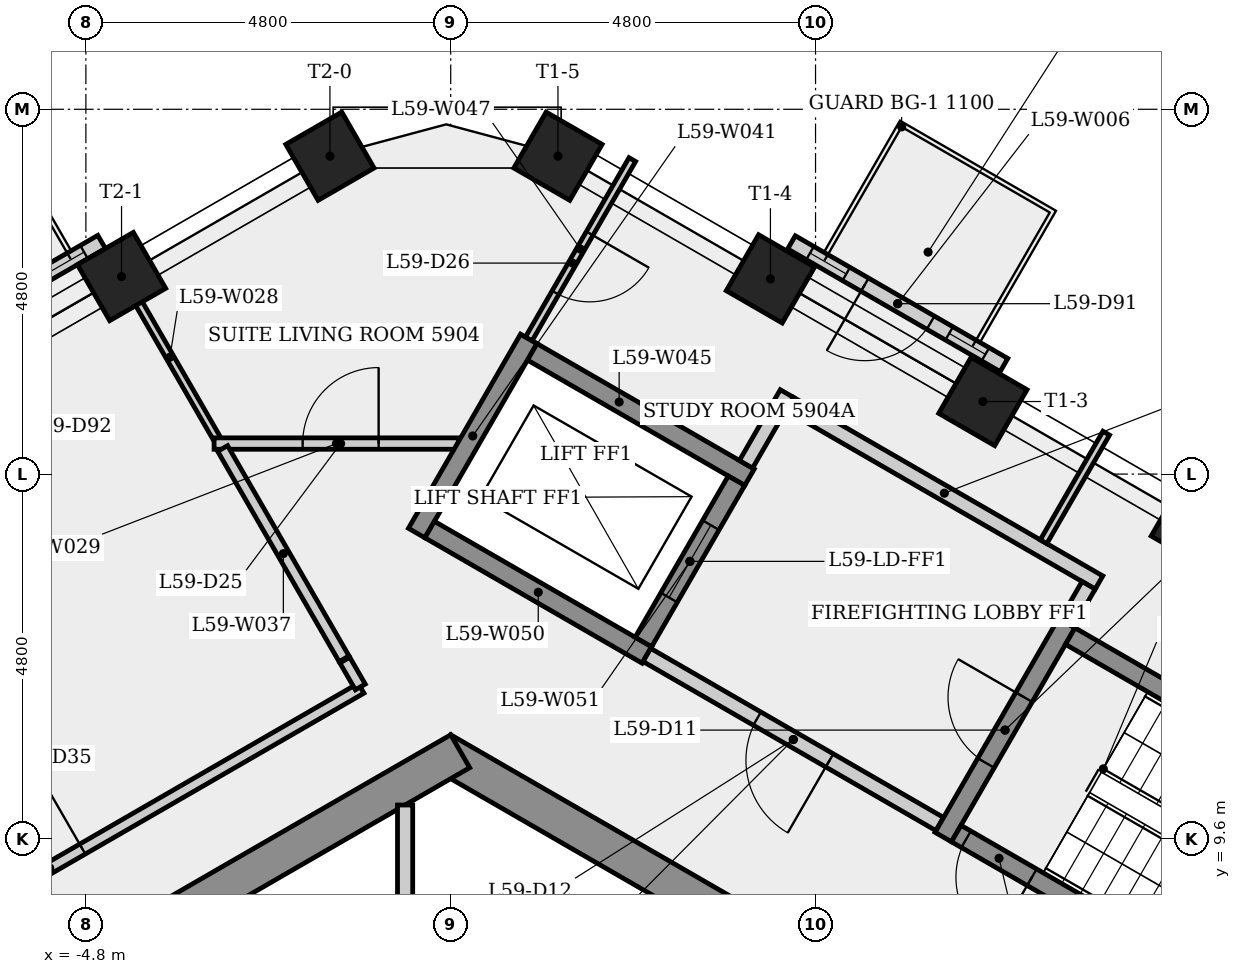
"""IFC4 building model, lengths in metres.
Left out: names, types, materials, properties, quantities, classifications, styles, units other than length and angle.
Written with IfcOpenShell. Run it as: python <this file> out.ifc"""

import sys

from ifc_helpers import new_model, si_unit, direction, frame, frame_2d, origin, origin_2d, place, context, subcontext, project, spatial, rectangle, extrude, element, fill, save


model = new_model("IFC4")
c1 = context("Model", 3, precision=1e-05, world=origin(), true_north=direction((0.0, 1.0)))
c2 = subcontext(c1, "Body", "Model", "MODEL_VIEW")
j1 = project(units=[si_unit("LENGTHUNIT", "METRE"), si_unit("PLANEANGLEUNIT", "RADIAN")], contexts=[c1])
p1 = place(None, origin())
s1 = spatial("IfcSite", under=j1, at=p1, CompositionType="ELEMENT")
p2 = place(p1, origin())
s2 = spatial("IfcBuilding", under=s1, at=p2, CompositionType="ELEMENT")
p3 = place(p2, frame((0.0, 0.0, 222.3)))
s3 = spatial("IfcBuildingStorey", under=s2, at=p3, CompositionType="ELEMENT", Elevation=222.3)
p4 = place(p3, frame((9.375, 5.268, 0.0), z_axis=(0.0, 0.0, 1.0), x_axis=(-0.866023993627, 0.500002442456, 0.0)))
e1 = element("IfcWall", 1, at=p4, inside=s3, PredefinedType="SHEAR", context=c2, shape_type="SweptSolid", body=[
    extrude(rectangle(XDim=10.97, YDim=0.5, at=frame_2d((5.485, 0.0))), origin(), (0.0, 0.0, 1.0), 3.4),
])
p5 = place(p4, frame((5.382, 0.0, 0.0)))
e2 = element("IfcOpeningElement", 2, at=p5, cuts=e1, PredefinedType="OPENING", context=c2, shape_type="SweptSolid", body=[
    extrude(rectangle(XDim=0.9, YDim=2.1, at=frame_2d((0.45, 1.05))), frame((0.0, 0.26, 0.0), z_axis=(0.0, -1.0, 0.0), x_axis=(1.0, 0.0, 0.0)), (0.0, 0.0, 1.0), 0.52),
])
p6 = place(p3, frame((0.125, 10.753, 0.0), z_axis=(0.0, 0.0, 1.0), x_axis=(-0.866023993627, -0.500002442456, 0.0)))
e3 = element("IfcWall", 3, at=p6, inside=s3, PredefinedType="SHEAR", context=c2, shape_type="SweptSolid", body=[
    extrude(rectangle(XDim=10.97, YDim=0.5, at=frame_2d((5.485, 0.0))), origin(), (0.0, 0.0, 1.0), 3.4),
])
p7 = place(p6, frame((7.08, 0.0, 0.0)))
e4 = element("IfcOpeningElement", 4, at=p7, cuts=e3, PredefinedType="OPENING", context=c2, shape_type="SweptSolid", body=[
    extrude(rectangle(XDim=0.9, YDim=2.1, at=frame_2d((0.45, 1.05))), frame((0.0, 0.26, 0.0), z_axis=(0.0, -1.0, 0.0), x_axis=(1.0, 0.0, 0.0)), (0.0, 0.0, 1.0), 0.52),
])
for number, where, z_axis, x_axis in (
    (5, (9.797, 13.741, 0.0), (0.0, 0.0, 1.0), (0.5, 0.866, 0.0)),
    (6, (7.001, 15.355, 0.0), (0.0, 0.0, 1.0), (0.5, 0.866, 0.0)),
    (7, (4.206, 16.969, 0.0), (0.0, 0.0, 1.0), (0.5, 0.866, 0.0)),
    (8, (1.411, 18.583, 0.0), (0.0, 0.0, 1.0), (0.5, 0.866, 0.0)),
    (9, (-1.589, 18.583, 0.0), (0.0, 0.0, 1.0), (-0.5, 0.866, 0.0)),
    (10, (-4.331, 17.0, 0.0), (0.0, 0.0, 1.0), (-0.5, 0.866, 0.0)),
):
    element("IfcColumn", number, at=place(p3, frame(where, z_axis=z_axis, x_axis=x_axis)), inside=s3, PredefinedType="COLUMN", context=c2, shape_type="SweptSolid", body=[
        extrude(rectangle(XDim=0.85, YDim=0.85, at=origin_2d()), origin(), (0.0, 0.0, 1.0), 3.4),
    ])
p8 = place(p3, frame((-4.593, 17.454, 0.0), z_axis=(0.0, 0.0, 1.0), x_axis=(-0.866023832351, -0.500002721793, 0.0)))
e11 = element("IfcWall", 11, at=p8, inside=s3, PredefinedType="SOLIDWALL", context=c2, shape_type="SweptSolid", body=[
    extrude(rectangle(XDim=3.167, YDim=0.2, at=frame_2d((1.583, 0.0))), origin(), (0.0, 0.0, 1.0), 3.4),
])
p9 = place(p8, frame((1.083, 0.0, 0.0)))
e12 = element("IfcOpeningElement", 12, at=p9, cuts=e11, PredefinedType="OPENING", context=c2, shape_type="SweptSolid", body=[
    extrude(rectangle(XDim=1.0, YDim=2.4, at=frame_2d((0.5, 1.2))), frame((0.0, 0.11, 0.0), z_axis=(0.0, -1.0, 0.0), x_axis=(1.0, 0.0, 0.0)), (0.0, 0.0, 1.0), 0.22),
])
p10 = place(p8, frame((0.267, 0.0, 0.9)))
e13 = element("IfcOpeningElement", 13, at=p10, cuts=e11, PredefinedType="OPENING", context=c2, shape_type="SweptSolid", body=[
    extrude(rectangle(XDim=0.55, YDim=1.5, at=frame_2d((0.275, 0.75))), frame((0.0, 0.11, 0.0), z_axis=(0.0, -1.0, 0.0), x_axis=(1.0, 0.0, 0.0)), (0.0, 0.0, 1.0), 0.22),
])
p11 = place(p8, frame((2.35, 0.0, 0.9)))
e14 = element("IfcOpeningElement", 14, at=p11, cuts=e11, PredefinedType="OPENING", context=c2, shape_type="SweptSolid", body=[
    extrude(rectangle(XDim=0.55, YDim=1.5, at=frame_2d((0.275, 0.75))), frame((0.0, 0.11, 0.0), z_axis=(0.0, -1.0, 0.0), x_axis=(1.0, 0.0, 0.0)), (0.0, 0.0, 1.0), 0.22),
])
p12 = place(p3, frame((7.279, 15.835, 0.0), z_axis=(0.0, 0.0, 1.0), x_axis=(-0.86601428741, 0.500019253631, 0.0)))
e15 = element("IfcWall", 15, at=p12, inside=s3, PredefinedType="SOLIDWALL", context=c2, shape_type="SweptSolid", body=[
    extrude(rectangle(XDim=3.228, YDim=0.2, at=frame_2d((1.614, 0.0))), origin(), (0.0, 0.0, 1.0), 3.4),
])
p13 = place(p12, frame((1.114, 0.0, 0.0)))
e16 = element("IfcOpeningElement", 16, at=p13, cuts=e15, PredefinedType="OPENING", context=c2, shape_type="SweptSolid", body=[
    extrude(rectangle(XDim=1.0, YDim=2.4, at=frame_2d((0.5, 1.2))), frame((0.0, 0.11, 0.0), z_axis=(0.0, -1.0, 0.0), x_axis=(1.0, 0.0, 0.0)), (0.0, 0.0, 1.0), 0.22),
])
p14 = place(p12, frame((0.282, 0.0, 0.9)))
e17 = element("IfcOpeningElement", 17, at=p14, cuts=e15, PredefinedType="OPENING", context=c2, shape_type="SweptSolid", body=[
    extrude(rectangle(XDim=0.55, YDim=1.5, at=frame_2d((0.275, 0.75))), frame((0.0, 0.11, 0.0), z_axis=(0.0, -1.0, 0.0), x_axis=(1.0, 0.0, 0.0)), (0.0, 0.0, 1.0), 0.22),
])
p15 = place(p12, frame((2.396, 0.0, 0.9)))
e18 = element("IfcOpeningElement", 18, at=p15, cuts=e15, PredefinedType="OPENING", context=c2, shape_type="SweptSolid", body=[
    extrude(rectangle(XDim=0.55, YDim=1.5, at=frame_2d((0.275, 0.75))), frame((0.0, 0.11, 0.0), z_axis=(0.0, -1.0, 0.0), x_axis=(1.0, 0.0, 0.0)), (0.0, 0.0, 1.0), 0.22),
])
p16 = place(p3, frame((-9.376, 6.85, 0.0), z_axis=(0.0, 0.0, 1.0), x_axis=(0.866029654818, 0.499992636921, 0.0)))
e19 = element("IfcWall", 19, at=p16, inside=s3, PredefinedType="PARTITIONING", context=c2, shape_type="SweptSolid", body=[
    extrude(rectangle(XDim=9.465, YDim=0.15, at=frame_2d((4.732, 0.0))), origin(), (0.0, 0.0, 1.0), 3.05),
])
p17 = place(p16, frame((4.232, 0.0, 0.0)))
e20 = element("IfcOpeningElement", 20, at=p17, cuts=e19, PredefinedType="OPENING", context=c2, shape_type="SweptSolid", body=[
    extrude(rectangle(XDim=1.0, YDim=2.1, at=frame_2d((0.5, 1.05))), frame((0.0, 0.085, 0.0), z_axis=(0.0, -1.0, 0.0), x_axis=(1.0, 0.0, 0.0)), (0.0, 0.0, 1.0), 0.17),
])
p18 = place(p3, frame((-3.076, 14.867, 0.0), z_axis=(0.0, 0.0, 1.0), x_axis=(-0.500001430823, 0.866024577697, 0.0)))
e21 = element("IfcWall", 21, at=p18, inside=s3, PredefinedType="PARTITIONING", context=c2, shape_type="SweptSolid", body=[
    extrude(rectangle(XDim=2.475, YDim=0.1, at=frame_2d((1.237, 0.0))), origin(), (0.0, 0.0, 1.0), 3.05),
])
p19 = place(p3, frame((-3.113, 14.802, 0.0), z_axis=(0.0, 0.0, 1.0), x_axis=(1.0, 0.0, 0.0)))
e22 = element("IfcWall", 22, at=p19, inside=s3, PredefinedType="PARTITIONING", context=c2, shape_type="SweptSolid", body=[
    extrude(rectangle(XDim=3.22, YDim=0.15, at=frame_2d((1.61, 0.0))), origin(), (0.0, 0.0, 1.0), 3.05),
])
p20 = place(p19, frame((1.165, 0.0, 0.0)))
e23 = element("IfcOpeningElement", 23, at=p20, cuts=e22, PredefinedType="OPENING", context=c2, shape_type="SweptSolid", body=[
    extrude(rectangle(XDim=1.0, YDim=2.1, at=frame_2d((0.5, 1.05))), frame((0.0, 0.085, 0.0), z_axis=(0.0, -1.0, 0.0), x_axis=(1.0, 0.0, 0.0)), (0.0, 0.0, 1.0), 0.17),
])
p21 = place(p3, frame((-1.403, 11.97, 0.0), z_axis=(0.0, 0.0, 1.0), x_axis=(-0.499960573946, 0.866048165231, 0.0)))
e24 = element("IfcWall", 24, at=p21, inside=s3, PredefinedType="PARTITIONING", context=c2, shape_type="SweptSolid", body=[
    extrude(rectangle(XDim=3.195, YDim=0.15, at=frame_2d((1.598, 0.0))), origin(), (0.0, 0.0, 1.0), 3.05),
])
p22 = place(p3, frame((-1.393, 11.952, 0.0), z_axis=(0.0, 0.0, 1.0), x_axis=(0.500068051468, -0.865986110686, 0.0)))
e25 = element("IfcWall", 25, at=p22, inside=s3, PredefinedType="PARTITIONING", context=c2, shape_type="SweptSolid", body=[
    extrude(rectangle(XDim=0.408, YDim=0.15, at=frame_2d((0.204, 0.0))), origin(), (0.0, 0.0, 1.0), 3.05),
])
p23 = place(p3, frame((-0.6, 10.046, 0.0), z_axis=(0.0, 0.0, 1.0), x_axis=(0.0, -1.0, 0.0)))
e26 = element("IfcWall", 26, at=p23, inside=s3, PredefinedType="PARTITIONING", context=c2, shape_type="SweptSolid", body=[
    extrude(rectangle(XDim=4.771, YDim=0.2, at=frame_2d((2.385, 0.0))), origin(), (0.0, 0.0, 1.0), 3.05),
])
p24 = place(p3, frame((-0.448, 13.624, 0.0), z_axis=(0.0, 0.0, 1.0), x_axis=(0.500037662692, 0.866003658127, 0.0)))
e27 = element("IfcWall", 27, at=p24, inside=s3, PredefinedType="SHEAR", context=c2, shape_type="SweptSolid", body=[
    extrude(rectangle(XDim=2.95, YDim=0.25, at=frame_2d((1.475, 0.0))), origin(), (0.0, 0.0, 1.0), 3.05),
])
p25 = place(p3, frame((1.073, 16.008, 0.0), z_axis=(0.0, 0.0, 1.0), x_axis=(0.866040211805, -0.499974350878, 0.0)))
e28 = element("IfcWall", 28, at=p25, inside=s3, PredefinedType="SHEAR", context=c2, shape_type="SweptSolid", body=[
    extrude(rectangle(XDim=3.3, YDim=0.25, at=frame_2d((1.65, 0.0))), origin(), (0.0, 0.0, 1.0), 3.05),
])
p26 = place(p3, frame((2.389, 18.538, 0.0), z_axis=(0.0, 0.0, 1.0), x_axis=(-0.500004325324, -0.866022906543, 0.0)))
e29 = element("IfcWall", 29, at=p26, inside=s3, PredefinedType="PARTITIONING", context=c2, shape_type="SweptSolid", body=[
    extrude(rectangle(XDim=2.724, YDim=0.1, at=frame_2d((1.362, 0.0))), origin(), (0.0, 0.0, 1.0), 3.05),
])
p27 = place(p26, frame((1.123, 0.0, 0.0)))
e30 = element("IfcOpeningElement", 30, at=p27, cuts=e29, PredefinedType="OPENING", context=c2, shape_type="SweptSolid", body=[
    extrude(rectangle(XDim=0.9, YDim=2.1, at=frame_2d((0.45, 1.05))), frame((0.0, 0.06, 0.0), z_axis=(0.0, -1.0, 0.0), x_axis=(1.0, 0.0, 0.0)), (0.0, 0.0, 1.0), 0.12),
])
p28 = place(p3, frame((2.581, 12.02, 0.0), z_axis=(0.0, 0.0, 1.0), x_axis=(-0.866040211805, 0.499974350878, 0.0)))
e31 = element("IfcWall", 31, at=p28, inside=s3, PredefinedType="SHEAR", context=c2, shape_type="SweptSolid", body=[
    extrude(rectangle(XDim=3.3, YDim=0.25, at=frame_2d((1.65, 0.0))), origin(), (0.0, 0.0, 1.0), 3.05),
])
p29 = place(p3, frame((2.535, 12.191, 0.0), z_axis=(0.0, 0.0, 1.0), x_axis=(0.500061746146, 0.865989751695, 0.0)))
e32 = element("IfcWall", 32, at=p29, inside=s3, PredefinedType="SHEAR", context=c2, shape_type="SweptSolid", body=[
    extrude(rectangle(XDim=2.45, YDim=0.25, at=frame_2d((1.225, 0.0))), origin(), (0.0, 0.0, 1.0), 3.4),
])
p30 = place(p29, frame((0.675, 0.0, 0.0)))
e33 = element("IfcOpeningElement", 33, at=p30, cuts=e32, PredefinedType="OPENING", context=c2, shape_type="SweptSolid", body=[
    extrude(rectangle(XDim=1.1, YDim=2.1, at=frame_2d((0.55, 1.05))), frame((0.0, 0.135, 0.0), z_axis=(0.0, -1.0, 0.0), x_axis=(1.0, 0.0, 0.0)), (0.0, 0.0, 1.0), 0.27),
])
p31 = place(p3, frame((3.885, 14.529, 0.0), z_axis=(0.0, 0.0, 1.0), x_axis=(0.499997628298, 0.866026773083, 0.0)))
e34 = element("IfcWall", 34, at=p31, inside=s3, PredefinedType="PARTITIONING", context=c2, shape_type="SweptSolid", body=[
    extrude(rectangle(XDim=1.075, YDim=0.2, at=frame_2d((0.538, 0.0))), origin(), (0.0, 0.0, 1.0), 3.05),
])
p32 = place(p3, frame((4.459, 15.323, 0.0), z_axis=(0.0, 0.0, 1.0), x_axis=(0.866016039709, -0.500016218704, 0.0)))
e35 = element("IfcWall", 35, at=p32, inside=s3, PredefinedType="PARTITIONING", context=c2, shape_type="SweptSolid", body=[
    extrude(rectangle(XDim=4.7, YDim=0.2, at=frame_2d((2.35, 0.0))), origin(), (0.0, 0.0, 1.0), 3.05),
])
p33 = place(p3, frame((6.435, 9.795, 0.0), z_axis=(0.0, 0.0, 1.0), x_axis=(-0.866012907634, 0.500021643343, 0.0)))
e36 = element("IfcWall", 36, at=p33, inside=s3, PredefinedType="PARTITIONING", context=c2, shape_type="SweptSolid", body=[
    extrude(rectangle(XDim=4.45, YDim=0.2, at=frame_2d((2.225, 0.0))), origin(), (0.0, 0.0, 1.0), 3.05),
])
p34 = place(p33, frame((1.675, 0.0, 0.0)))
e37 = element("IfcOpeningElement", 37, at=p34, cuts=e36, PredefinedType="OPENING", context=c2, shape_type="SweptSolid", body=[
    extrude(rectangle(XDim=1.1, YDim=2.1, at=frame_2d((0.55, 1.05))), frame((0.0, 0.11, 0.0), z_axis=(0.0, -1.0, 0.0), x_axis=(1.0, 0.0, 0.0)), (0.0, 0.0, 1.0), 0.22),
])
p35 = place(p3, frame((6.48, 9.624, 0.0), z_axis=(0.0, 0.0, 1.0), x_axis=(0.500017246033, 0.866015446554, 0.0)))
e38 = element("IfcWall", 38, at=p35, inside=s3, PredefinedType="SHEAR", context=c2, shape_type="SweptSolid", body=[
    extrude(rectangle(XDim=3.25, YDim=0.25, at=frame_2d((1.625, 0.0))), origin(), (0.0, 0.0, 1.0), 3.05),
])
p36 = place(p35, frame((1.125, 0.0, 0.0)))
e39 = element("IfcOpeningElement", 39, at=p36, cuts=e38, PredefinedType="OPENING", context=c2, shape_type="SweptSolid", body=[
    extrude(rectangle(XDim=1.0, YDim=2.1, at=frame_2d((0.5, 1.05))), frame((0.0, 0.135, 0.0), z_axis=(0.0, -1.0, 0.0), x_axis=(1.0, 0.0, 0.0)), (0.0, 0.0, 1.0), 0.27),
])
p37 = place(p3, frame((7.8, 13.51, 0.0), z_axis=(0.0, 0.0, 1.0), x_axis=(0.499944585209, 0.866057395165, 0.0)))
e40 = element("IfcWall", 40, at=p37, inside=s3, PredefinedType="PARTITIONING", context=c2, shape_type="SweptSolid", body=[
    extrude(rectangle(XDim=1.649, YDim=0.1, at=frame_2d((0.825, 0.0))), origin(), (0.0, 0.0, 1.0), 3.05),
])
p38 = place(p3, frame((8.151, 12.268, 0.0), z_axis=(0.0, 0.0, 1.0), x_axis=(0.866025499775, -0.499999833739, 0.0)))
e41 = element("IfcWall", 41, at=p38, inside=s3, PredefinedType="SHEAR", context=c2, shape_type="SweptSolid", body=[
    extrude(rectangle(XDim=6.4, YDim=0.25, at=frame_2d((3.2, 0.0))), origin(), (0.0, 0.0, 1.0), 3.05),
])
p39 = place(p3, frame((8.393, 12.937, 0.0), z_axis=(0.0, 0.0, 1.0), x_axis=(-0.500065409566, -0.86598763626, 0.0)))
e42 = element("IfcWall", 42, at=p39, inside=s3, PredefinedType="PARTITIONING", context=c2, shape_type="SweptSolid", body=[
    extrude(rectangle(XDim=0.575, YDim=0.2, at=frame_2d((0.288, 0.0))), origin(), (0.0, 0.0, 1.0), 3.05),
])
p40 = place(p3, frame((12.194, 6.47, 0.0), z_axis=(0.0, 0.0, 1.0), x_axis=(-0.866025499775, 0.499999833739, 0.0)))
e43 = element("IfcWall", 43, at=p40, inside=s3, PredefinedType="SHEAR", context=c2, shape_type="SweptSolid", body=[
    extrude(rectangle(XDim=6.4, YDim=0.25, at=frame_2d((3.2, 0.0))), origin(), (0.0, 0.0, 1.0), 3.05),
])
p41 = place(p40, frame((5.25, 0.0, 0.0)))
e44 = element("IfcOpeningElement", 44, at=p41, cuts=e43, PredefinedType="OPENING", context=c2, shape_type="SweptSolid", body=[
    extrude(rectangle(XDim=1.0, YDim=2.1, at=frame_2d((0.5, 1.05))), frame((0.0, 0.135, 0.0), z_axis=(0.0, -1.0, 0.0), x_axis=(1.0, 0.0, 0.0)), (0.0, 0.0, 1.0), 0.27),
])
p42 = place(p10, origin())
e45 = element("IfcWindow", 45, at=p42, inside=s3, PartitioningType="SINGLE_PANEL", PredefinedType="WINDOW", context=c2, shape_type="SweptSolid", body=[
    extrude(rectangle(XDim=0.55, YDim=1.5, at=frame_2d((0.275, 0.75))), frame((0.0, 0.03, 0.0), z_axis=(0.0, -1.0, 0.0), x_axis=(1.0, 0.0, 0.0)), (0.0, 0.0, 1.0), 0.06),
])
fill(e13, e45)
p43 = place(p13, origin())
e46 = element("IfcDoor", 46, at=p43, inside=s3, OperationType="SINGLE_SWING_RIGHT", PredefinedType="DOOR", context=c2, shape_type="SweptSolid", body=[
    extrude(rectangle(XDim=1.0, YDim=2.4, at=frame_2d((0.5, 1.2))), frame((0.0, 0.025, 0.0), z_axis=(0.0, -1.0, 0.0), x_axis=(1.0, 0.0, 0.0)), (0.0, 0.0, 1.0), 0.05),
])
fill(e16, e46)
p44 = place(p14, origin())
e47 = element("IfcWindow", 47, at=p44, inside=s3, PartitioningType="SINGLE_PANEL", PredefinedType="WINDOW", context=c2, shape_type="SweptSolid", body=[
    extrude(rectangle(XDim=0.55, YDim=1.5, at=frame_2d((0.275, 0.75))), frame((0.0, 0.03, 0.0), z_axis=(0.0, -1.0, 0.0), x_axis=(1.0, 0.0, 0.0)), (0.0, 0.0, 1.0), 0.06),
])
fill(e17, e47)
p45 = place(p15, origin())
e48 = element("IfcWindow", 48, at=p45, inside=s3, PartitioningType="SINGLE_PANEL", PredefinedType="WINDOW", context=c2, shape_type="SweptSolid", body=[
    extrude(rectangle(XDim=0.55, YDim=1.5, at=frame_2d((0.275, 0.75))), frame((0.0, 0.03, 0.0), z_axis=(0.0, -1.0, 0.0), x_axis=(1.0, 0.0, 0.0)), (0.0, 0.0, 1.0), 0.06),
])
fill(e18, e48)
p46 = place(p41, origin())
e49 = element("IfcDoor", 49, at=p46, inside=s3, OperationType="SINGLE_SWING_LEFT", PredefinedType="DOOR", context=c2, shape_type="SweptSolid", body=[
    extrude(rectangle(XDim=1.0, YDim=2.1, at=frame_2d((0.5, 1.05))), frame((0.0, 0.025, 0.0), z_axis=(0.0, -1.0, 0.0), x_axis=(1.0, 0.0, 0.0)), (0.0, 0.0, 1.0), 0.05),
])
fill(e44, e49)
p47 = place(p36, origin())
e50 = element("IfcDoor", 50, at=p47, inside=s3, OperationType="SINGLE_SWING_RIGHT", PredefinedType="DOOR", context=c2, shape_type="SweptSolid", body=[
    extrude(rectangle(XDim=1.0, YDim=2.1, at=frame_2d((0.5, 1.05))), frame((0.0, 0.025, 0.0), z_axis=(0.0, -1.0, 0.0), x_axis=(1.0, 0.0, 0.0)), (0.0, 0.0, 1.0), 0.05),
])
fill(e39, e50)
p48 = place(p34, origin())
e51 = element("IfcDoor", 51, at=p48, inside=s3, OperationType="SINGLE_SWING_LEFT", PredefinedType="DOOR", context=c2, shape_type="SweptSolid", body=[
    extrude(rectangle(XDim=1.1, YDim=2.1, at=frame_2d((0.55, 1.05))), frame((0.0, 0.025, 0.0), z_axis=(0.0, -1.0, 0.0), x_axis=(1.0, 0.0, 0.0)), (0.0, 0.0, 1.0), 0.05),
])
fill(e37, e51)
p49 = place(p30, origin())
e52 = element("IfcDoor", 52, at=p49, inside=s3, OperationType="SLIDING_TO_LEFT", PredefinedType="DOOR", context=c2, shape_type="SweptSolid", body=[
    extrude(rectangle(XDim=1.1, YDim=2.1, at=frame_2d((0.55, 1.05))), frame((0.0, 0.025, 0.0), z_axis=(0.0, -1.0, 0.0), x_axis=(1.0, 0.0, 0.0)), (0.0, 0.0, 1.0), 0.05),
])
fill(e33, e52)
p50 = place(p20, origin())
e53 = element("IfcDoor", 53, at=p50, inside=s3, OperationType="SINGLE_SWING_RIGHT", PredefinedType="DOOR", context=c2, shape_type="SweptSolid", body=[
    extrude(rectangle(XDim=1.0, YDim=2.1, at=frame_2d((0.5, 1.05))), frame((0.0, 0.025, 0.0), z_axis=(0.0, -1.0, 0.0), x_axis=(1.0, 0.0, 0.0)), (0.0, 0.0, 1.0), 0.05),
])
fill(e23, e53)
p51 = place(p27, origin())
e54 = element("IfcDoor", 54, at=p51, inside=s3, OperationType="SINGLE_SWING_LEFT", PredefinedType="DOOR", context=c2, shape_type="SweptSolid", body=[
    extrude(rectangle(XDim=0.9, YDim=2.1, at=frame_2d((0.45, 1.05))), frame((0.0, 0.025, 0.0), z_axis=(0.0, -1.0, 0.0), x_axis=(1.0, 0.0, 0.0)), (0.0, 0.0, 1.0), 0.05),
])
fill(e30, e54)
p52 = place(p17, origin())
e55 = element("IfcDoor", 55, at=p52, inside=s3, OperationType="SINGLE_SWING_RIGHT", PredefinedType="DOOR", context=c2, shape_type="SweptSolid", body=[
    extrude(rectangle(XDim=1.0, YDim=2.1, at=frame_2d((0.5, 1.05))), frame((0.0, 0.025, 0.0), z_axis=(0.0, -1.0, 0.0), x_axis=(1.0, 0.0, 0.0)), (0.0, 0.0, 1.0), 0.05),
])
fill(e20, e55)
save(model, sys.argv[1])
